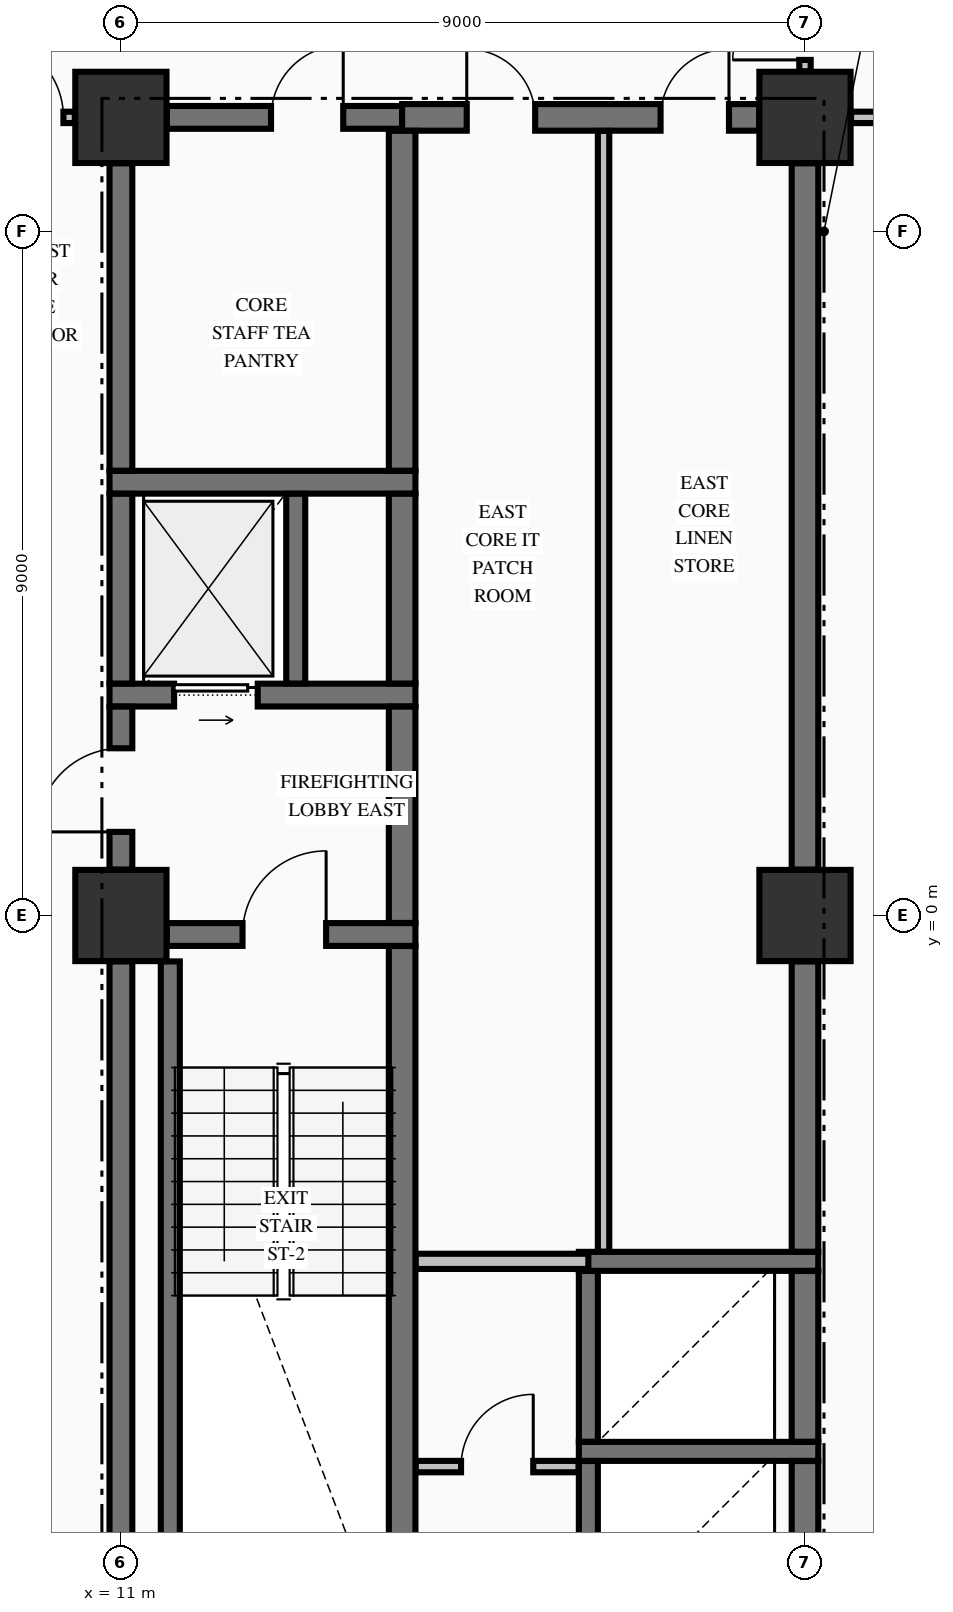
"""IFC4 building model, lengths in metres.
Left out: names, types, materials, properties, quantities, classifications, styles, units other than length and angle.
Written with IfcOpenShell. Run it as: python <this file> out.ifc"""

import sys

from ifc_helpers import new_model, si_unit, direction, frame, frame_2d, origin, origin_2d, place, context, subcontext, project, spatial, rectangle, extrude, element, fill, save


model = new_model("IFC4")
c1 = context("Model", 3, precision=1e-05, world=origin(), true_north=direction((0.0, 1.0)))
c2 = subcontext(c1, "Body", "Model", "MODEL_VIEW")
j1 = project(units=[si_unit("LENGTHUNIT", "METRE"), si_unit("PLANEANGLEUNIT", "RADIAN")], contexts=[c1])
p1 = place(None, origin())
s1 = spatial("IfcSite", under=j1, at=p1, CompositionType="ELEMENT")
p2 = place(p1, origin())
s2 = spatial("IfcBuilding", under=s1, at=p2, CompositionType="ELEMENT")
p3 = place(p2, frame((0.0, 0.0, 48.62)))
s3 = spatial("IfcBuildingStorey", under=s2, at=p3, CompositionType="ELEMENT", Elevation=48.62)
for number, where, z_axis, x_axis in (
    (1, (11.0, 0.0, -0.25), (0.0, 0.0, 1.0), (1.0, 0.0, 0.0)),
    (2, (11.0, 10.5, -0.25), (0.0, 0.0, 1.0), (1.0, 0.0, 0.0)),
    (3, (20.0, 10.5, -0.25), (0.0, 0.0, 1.0), (1.0, 0.0, 0.0)),
    (4, (20.0, 0.0, -0.25), (0.0, 0.0, 1.0), (1.0, 0.0, 0.0)),
):
    element("IfcColumn", number, at=place(p3, frame(where, z_axis=z_axis, x_axis=x_axis)), inside=s3, PredefinedType="COLUMN", context=c2, shape_type="SweptSolid", body=[
        extrude(rectangle(XDim=1.2, YDim=1.2, at=origin_2d()), origin(), (0.0, 0.0, 1.0), 3.395),
    ])
for number, where, z_axis, x_axis in (
    (5, (17.025, -7.05, 0.0), (0.0, 0.0, 1.0), (1.0, 0.0, 0.0)),
    (6, (17.025, -4.55, 0.0), (0.0, 0.0, 1.0), (1.0, 0.0, 0.0)),
):
    element("IfcWall", number, at=place(p3, frame(where, z_axis=z_axis, x_axis=x_axis)), inside=s3, PredefinedType="SOLIDWALL", context=c2, shape_type="SweptSolid", body=[
        extrude(rectangle(XDim=3.15, YDim=0.25, at=frame_2d((1.575, 0.0))), origin(), (0.0, 0.0, 1.0), 3.145),
    ])
p4 = place(p3, frame((11.604, -0.25, 0.0), z_axis=(0.0, 0.0, 1.0), x_axis=(1.0, 0.0, 0.0)))
e7 = element("IfcWall", 7, at=p4, inside=s3, PredefinedType="SHEAR", context=c2, shape_type="SweptSolid", body=[
    extrude(rectangle(XDim=3.271, YDim=0.3, at=frame_2d((1.635, 0.0))), origin(), (0.0, 0.0, 1.0), 3.145),
])
p5 = place(p4, frame((0.996, 0.0, 0.0)))
e8 = element("IfcOpeningElement", 8, at=p5, cuts=e7, PredefinedType="OPENING", context=c2, shape_type="SweptSolid", body=[
    extrude(rectangle(XDim=1.1, YDim=2.15, at=frame_2d((0.55, 1.075))), frame((0.0, 0.16, 0.0), z_axis=(0.0, -1.0, 0.0), x_axis=(1.0, 0.0, 0.0)), (0.0, 0.0, 1.0), 0.32),
])
p6 = place(p3, frame((10.85, 2.9, 0.0), z_axis=(0.0, 0.0, 1.0), x_axis=(1.0, 0.0, 0.0)))
e9 = element("IfcWall", 9, at=p6, inside=s3, PredefinedType="SHEAR", context=c2, shape_type="SweptSolid", body=[
    extrude(rectangle(XDim=4.025, YDim=0.3, at=frame_2d((2.012, 0.0))), origin(), (0.0, 0.0, 1.0), 3.145),
])
p7 = place(p6, frame((0.85, 0.0, 0.0)))
e10 = element("IfcOpeningElement", 10, at=p7, cuts=e9, PredefinedType="OPENING", context=c2, shape_type="SweptSolid", body=[
    extrude(rectangle(XDim=1.1, YDim=2.2, at=frame_2d((0.55, 1.1))), frame((0.0, 0.16, 0.0), z_axis=(0.0, -1.0, 0.0), x_axis=(1.0, 0.0, 0.0)), (0.0, 0.0, 1.0), 0.32),
])
p8 = place(p3, frame((10.85, 5.7, 0.0), z_axis=(0.0, 0.0, 1.0), x_axis=(1.0, 0.0, 0.0)))
e11 = element("IfcWall", 11, at=p8, inside=s3, PredefinedType="SHEAR", context=c2, shape_type="SweptSolid", body=[
    extrude(rectangle(XDim=4.025, YDim=0.3, at=frame_2d((2.012, 0.0))), origin(), (0.0, 0.0, 1.0), 3.145),
])
p9 = place(p3, frame((11.604, 10.5, 0.0), z_axis=(0.0, 0.0, 1.0), x_axis=(1.0, 0.0, 0.0)))
e12 = element("IfcWall", 12, at=p9, inside=s3, PredefinedType="SHEAR", context=c2, shape_type="SweptSolid", body=[
    extrude(rectangle(XDim=3.096, YDim=0.3, at=frame_2d((1.548, 0.0))), origin(), (0.0, 0.0, 1.0), 3.145),
])
p10 = place(p9, frame((1.371, 0.0, 0.0)))
e13 = element("IfcOpeningElement", 13, at=p10, cuts=e12, PredefinedType="OPENING", context=c2, shape_type="SweptSolid", body=[
    extrude(rectangle(XDim=0.95, YDim=2.15, at=frame_2d((0.475, 1.075))), frame((0.0, 0.16, 0.0), z_axis=(0.0, -1.0, 0.0), x_axis=(1.0, 0.0, 0.0)), (0.0, 0.0, 1.0), 0.32),
])
p11 = place(p3, frame((14.7, 10.5, 0.0), z_axis=(0.0, 0.0, 1.0), x_axis=(1.0, 0.0, 0.0)))
e14 = element("IfcWall", 14, at=p11, inside=s3, PredefinedType="SHEAR", context=c2, shape_type="SweptSolid", body=[
    extrude(rectangle(XDim=4.696, YDim=0.35, at=frame_2d((2.348, 0.0))), origin(), (0.0, 0.0, 1.0), 3.145),
])
p12 = place(p11, frame((0.85, 0.0, 0.0)))
e15 = element("IfcOpeningElement", 15, at=p12, cuts=e14, PredefinedType="OPENING", context=c2, shape_type="SweptSolid", body=[
    extrude(rectangle(XDim=0.9, YDim=2.15, at=frame_2d((0.45, 1.075))), frame((0.0, 0.185, 0.0), z_axis=(0.0, -1.0, 0.0), x_axis=(1.0, 0.0, 0.0)), (0.0, 0.0, 1.0), 0.37),
])
p13 = place(p11, frame((3.4, 0.0, 0.0)))
e16 = element("IfcOpeningElement", 16, at=p13, cuts=e14, PredefinedType="OPENING", context=c2, shape_type="SweptSolid", body=[
    extrude(rectangle(XDim=0.9, YDim=2.15, at=frame_2d((0.45, 1.075))), frame((0.0, 0.185, 0.0), z_axis=(0.0, -1.0, 0.0), x_axis=(1.0, 0.0, 0.0)), (0.0, 0.0, 1.0), 0.37),
])
p14 = place(p3, frame((14.878, -7.25, 0.0), z_axis=(0.0, 0.0, 1.0), x_axis=(1.0, 0.0, 0.0)))
e17 = element("IfcWall", 17, at=p14, inside=s3, PredefinedType="PARTITIONING", context=c2, shape_type="SweptSolid", body=[
    extrude(rectangle(XDim=2.144, YDim=0.15, at=frame_2d((1.072, 0.0))), origin(), (0.0, 0.0, 1.0), 3.145),
])
p15 = place(p14, frame((0.597, 0.0, 0.0)))
e18 = element("IfcOpeningElement", 18, at=p15, cuts=e17, PredefinedType="OPENING", context=c2, shape_type="SweptSolid", body=[
    extrude(rectangle(XDim=0.95, YDim=2.15, at=frame_2d((0.475, 1.075))), frame((0.0, 0.085, 0.0), z_axis=(0.0, -1.0, 0.0), x_axis=(1.0, 0.0, 0.0)), (0.0, 0.0, 1.0), 0.17),
])
p16 = place(p3, frame((14.878, -4.55, 0.0), z_axis=(0.0, 0.0, 1.0), x_axis=(1.0, 0.0, 0.0)))
e19 = element("IfcWall", 19, at=p16, inside=s3, PredefinedType="PARTITIONING", context=c2, shape_type="SweptSolid", body=[
    extrude(rectangle(XDim=2.272, YDim=0.2, at=frame_2d((1.136, 0.0))), origin(), (0.0, 0.0, 1.0), 3.145),
])
p17 = place(p3, frame((-10.394, 10.5, 0.0), z_axis=(0.0, 0.0, 1.0), x_axis=(1.0, 0.0, 0.0)))
e20 = element("IfcWall", 20, at=p17, inside=s3, PredefinedType="PARTITIONING", context=c2, shape_type="SweptSolid", body=[
    extrude(rectangle(XDim=20.788, YDim=0.15, at=frame_2d((10.394, 0.0))), origin(), (0.0, 0.0, 1.0), 3.145),
])
p18 = place(p17, frame((0.15, 0.0, 0.0)))
e21 = element("IfcOpeningElement", 21, at=p18, cuts=e20, PredefinedType="OPENING", context=c2, shape_type="SweptSolid", body=[
    extrude(rectangle(XDim=1.05, YDim=2.15, at=frame_2d((0.525, 1.075))), frame((0.0, 0.085, 0.0), z_axis=(0.0, -1.0, 0.0), x_axis=(1.0, 0.0, 0.0)), (0.0, 0.0, 1.0), 0.17),
])
p19 = place(p17, frame((19.588, 0.0, 0.0)))
e22 = element("IfcOpeningElement", 22, at=p19, cuts=e20, PredefinedType="OPENING", context=c2, shape_type="SweptSolid", body=[
    extrude(rectangle(XDim=1.05, YDim=2.15, at=frame_2d((0.525, 1.075))), frame((0.0, 0.085, 0.0), z_axis=(0.0, -1.0, 0.0), x_axis=(1.0, 0.0, 0.0)), (0.0, 0.0, 1.0), 0.17),
])
p20 = place(p3, frame((20.606, 10.5, 0.0), z_axis=(0.0, 0.0, 1.0), x_axis=(1.0, 0.0, 0.0)))
e23 = element("IfcWall", 23, at=p20, inside=s3, PredefinedType="PARTITIONING", context=c2, shape_type="SweptSolid", body=[
    extrude(rectangle(XDim=8.229, YDim=0.15, at=frame_2d((4.115, 0.0))), origin(), (0.0, 0.0, 1.0), 3.145),
])
p21 = place(p20, frame((3.394, 0.0, 0.0)))
e24 = element("IfcOpeningElement", 24, at=p21, cuts=e23, PredefinedType="OPENING", context=c2, shape_type="SweptSolid", body=[
    extrude(rectangle(XDim=1.0, YDim=2.15, at=frame_2d((0.5, 1.075))), frame((0.0, 0.085, 0.0), z_axis=(0.0, -1.0, 0.0), x_axis=(1.0, 0.0, 0.0)), (0.0, 0.0, 1.0), 0.17),
])
p22 = place(p3, frame((11.0, -9.346, 0.0), z_axis=(0.0, 0.0, 1.0), x_axis=(0.0, 1.0, 0.0)))
e25 = element("IfcWall", 25, at=p22, inside=s3, PredefinedType="SHEAR", context=c2, shape_type="SweptSolid", body=[
    extrude(rectangle(XDim=8.742, YDim=0.3, at=frame_2d((4.371, 0.0))), origin(), (0.0, 0.0, 1.0), 3.145),
])
p23 = place(p3, frame((11.0, 0.604, 0.0), z_axis=(0.0, 0.0, 1.0), x_axis=(0.0, 1.0, 0.0)))
e26 = element("IfcWall", 26, at=p23, inside=s3, PredefinedType="SHEAR", context=c2, shape_type="SweptSolid", body=[
    extrude(rectangle(XDim=2.144, YDim=0.3, at=frame_2d((1.072, 0.0))), origin(), (0.0, 0.0, 1.0), 3.145),
])
p24 = place(p23, frame((0.496, 0.0, 0.0)))
e27 = element("IfcOpeningElement", 27, at=p24, cuts=e26, PredefinedType="OPENING", context=c2, shape_type="SweptSolid", body=[
    extrude(rectangle(XDim=1.1, YDim=2.15, at=frame_2d((0.55, 1.075))), frame((0.0, 0.16, 0.0), z_axis=(0.0, -1.0, 0.0), x_axis=(1.0, 0.0, 0.0)), (0.0, 0.0, 1.0), 0.32),
])
p25 = place(p3, frame((11.0, 3.052, 0.0), z_axis=(0.0, 0.0, 1.0), x_axis=(0.0, 1.0, 0.0)))
e28 = element("IfcWall", 28, at=p25, inside=s3, PredefinedType="SHEAR", context=c2, shape_type="SweptSolid", body=[
    extrude(rectangle(XDim=2.496, YDim=0.3, at=frame_2d((1.248, 0.0))), origin(), (0.0, 0.0, 1.0), 3.145),
])
p26 = place(p3, frame((11.0, 5.852, 0.0), z_axis=(0.0, 0.0, 1.0), x_axis=(0.0, 1.0, 0.0)))
e29 = element("IfcWall", 29, at=p26, inside=s3, PredefinedType="SHEAR", context=c2, shape_type="SweptSolid", body=[
    extrude(rectangle(XDim=4.044, YDim=0.3, at=frame_2d((2.022, 0.0))), origin(), (0.0, 0.0, 1.0), 3.145),
])
p27 = place(p3, frame((11.65, -9.346, 0.0), z_axis=(0.0, 0.0, 1.0), x_axis=(0.0, 1.0, 0.0)))
e30 = element("IfcWall", 30, at=p27, inside=s3, PredefinedType="SOLIDWALL", context=c2, shape_type="SweptSolid", body=[
    extrude(rectangle(XDim=8.742, YDim=0.25, at=frame_2d((4.371, 0.0))), origin(), (0.0, 0.0, 1.0), 3.145),
])
p28 = place(p3, frame((13.3, 3.052, 0.0), z_axis=(0.0, 0.0, 1.0), x_axis=(0.0, 1.0, 0.0)))
e31 = element("IfcWall", 31, at=p28, inside=s3, PredefinedType="SOLIDWALL", context=c2, shape_type="SweptSolid", body=[
    extrude(rectangle(XDim=2.496, YDim=0.25, at=frame_2d((1.248, 0.0))), origin(), (0.0, 0.0, 1.0), 3.145),
])
p29 = place(p3, frame((14.7, -9.773, 0.0), z_axis=(0.0, 0.0, 1.0), x_axis=(0.0, 1.0, 0.0)))
e32 = element("IfcWall", 32, at=p29, inside=s3, PredefinedType="SHEAR", context=c2, shape_type="SweptSolid", body=[
    extrude(rectangle(XDim=9.371, YDim=0.35, at=frame_2d((4.686, 0.0))), origin(), (0.0, 0.0, 1.0), 3.145),
])
p30 = place(p3, frame((14.7, -0.098, 0.0), z_axis=(0.0, 0.0, 1.0), x_axis=(0.0, 1.0, 0.0)))
e33 = element("IfcWall", 33, at=p30, inside=s3, PredefinedType="SHEAR", context=c2, shape_type="SweptSolid", body=[
    extrude(rectangle(XDim=2.846, YDim=0.35, at=frame_2d((1.423, 0.0))), origin(), (0.0, 0.0, 1.0), 3.145),
])
p31 = place(p3, frame((14.7, 3.052, 0.0), z_axis=(0.0, 0.0, 1.0), x_axis=(0.0, 1.0, 0.0)))
e34 = element("IfcWall", 34, at=p31, inside=s3, PredefinedType="SHEAR", context=c2, shape_type="SweptSolid", body=[
    extrude(rectangle(XDim=2.496, YDim=0.35, at=frame_2d((1.248, 0.0))), origin(), (0.0, 0.0, 1.0), 3.145),
])
p32 = place(p3, frame((14.7, 5.852, 0.0), z_axis=(0.0, 0.0, 1.0), x_axis=(0.0, 1.0, 0.0)))
e35 = element("IfcWall", 35, at=p32, inside=s3, PredefinedType="SHEAR", context=c2, shape_type="SweptSolid", body=[
    extrude(rectangle(XDim=4.471, YDim=0.35, at=frame_2d((2.235, 0.0))), origin(), (0.0, 0.0, 1.0), 3.145),
])
p33 = place(p3, frame((17.15, -9.773, 0.0), z_axis=(0.0, 0.0, 1.0), x_axis=(0.0, 1.0, 0.0)))
e36 = element("IfcWall", 36, at=p33, inside=s3, PredefinedType="SOLIDWALL", context=c2, shape_type="SweptSolid", body=[
    extrude(rectangle(XDim=2.596, YDim=0.25, at=frame_2d((1.298, 0.0))), origin(), (0.0, 0.0, 1.0), 3.145),
])
p34 = place(p3, frame((17.15, -6.923, 0.0), z_axis=(0.0, 0.0, 1.0), x_axis=(0.0, 1.0, 0.0)))
e37 = element("IfcWall", 37, at=p34, inside=s3, PredefinedType="SOLIDWALL", context=c2, shape_type="SweptSolid", body=[
    extrude(rectangle(XDim=2.246, YDim=0.25, at=frame_2d((1.123, 0.0))), origin(), (0.0, 0.0, 1.0), 3.145),
])
p35 = place(p3, frame((20.0, -9.346, 0.0), z_axis=(0.0, 0.0, 1.0), x_axis=(0.0, 1.0, 0.0)))
e38 = element("IfcWall", 38, at=p35, inside=s3, PredefinedType="SHEAR", context=c2, shape_type="SweptSolid", body=[
    extrude(rectangle(XDim=2.169, YDim=0.35, at=frame_2d((1.084, 0.0))), origin(), (0.0, 0.0, 1.0), 3.145),
])
p36 = place(p3, frame((20.0, -6.923, 0.0), z_axis=(0.0, 0.0, 1.0), x_axis=(0.0, 1.0, 0.0)))
e39 = element("IfcWall", 39, at=p36, inside=s3, PredefinedType="SHEAR", context=c2, shape_type="SweptSolid", body=[
    extrude(rectangle(XDim=2.246, YDim=0.35, at=frame_2d((1.123, 0.0))), origin(), (0.0, 0.0, 1.0), 3.145),
])
p37 = place(p3, frame((20.0, -4.423, 0.0), z_axis=(0.0, 0.0, 1.0), x_axis=(0.0, 1.0, 0.0)))
e40 = element("IfcWall", 40, at=p37, inside=s3, PredefinedType="SHEAR", context=c2, shape_type="SweptSolid", body=[
    extrude(rectangle(XDim=3.819, YDim=0.35, at=frame_2d((1.91, 0.0))), origin(), (0.0, 0.0, 1.0), 3.145),
])
p38 = place(p3, frame((20.0, 0.604, 0.0), z_axis=(0.0, 0.0, 1.0), x_axis=(0.0, 1.0, 0.0)))
e41 = element("IfcWall", 41, at=p38, inside=s3, PredefinedType="SHEAR", context=c2, shape_type="SweptSolid", body=[
    extrude(rectangle(XDim=9.292, YDim=0.35, at=frame_2d((4.646, 0.0))), origin(), (0.0, 0.0, 1.0), 3.145),
])
p39 = place(p3, frame((17.35, -4.422, 0.0), z_axis=(0.0, 0.0, 1.0), x_axis=(0.0, 1.0, 0.0)))
e42 = element("IfcWall", 42, at=p39, inside=s3, PredefinedType="PARTITIONING", context=c2, shape_type="SweptSolid", body=[
    extrude(rectangle(XDim=14.744, YDim=0.15, at=frame_2d((7.372, 0.0))), origin(), (0.0, 0.0, 1.0), 3.145),
])
p40 = place(p3, frame((20.0, 11.106, 0.0), z_axis=(0.0, 0.0, 1.0), x_axis=(0.0, 1.0, 0.0)))
e43 = element("IfcWall", 43, at=p40, inside=s3, PredefinedType="PARTITIONING", context=c2, shape_type="SweptSolid", body=[
    extrude(rectangle(XDim=1.766, YDim=0.15, at=frame_2d((0.883, 0.0))), origin(), (0.0, 0.0, 1.0), 2.485),
])
p41 = place(p40, frame((0.15, 0.0, 0.0)))
e44 = element("IfcOpeningElement", 44, at=p41, cuts=e43, PredefinedType="OPENING", context=c2, shape_type="SweptSolid", body=[
    extrude(rectangle(XDim=0.95, YDim=2.15, at=frame_2d((0.475, 1.075))), frame((0.0, 0.085, 0.0), z_axis=(0.0, -1.0, 0.0), x_axis=(1.0, 0.0, 0.0)), (0.0, 0.0, 1.0), 0.17),
])
p42 = place(p5, origin())
e45 = element("IfcDoor", 45, at=p42, inside=s3, OperationType="SINGLE_SWING_RIGHT", PredefinedType="DOOR", context=c2, shape_type="SweptSolid", body=[
    extrude(rectangle(XDim=1.1, YDim=2.15, at=frame_2d((0.55, 1.075))), frame((0.0, 0.025, 0.0), z_axis=(0.0, -1.0, 0.0), x_axis=(1.0, 0.0, 0.0)), (0.0, 0.0, 1.0), 0.05),
])
fill(e8, e45)
p43 = place(p24, origin())
e46 = element("IfcDoor", 46, at=p43, inside=s3, OperationType="SINGLE_SWING_LEFT", PredefinedType="DOOR", context=c2, shape_type="SweptSolid", body=[
    extrude(rectangle(XDim=1.1, YDim=2.15, at=frame_2d((0.55, 1.075))), frame((0.0, 0.025, 0.0), z_axis=(0.0, -1.0, 0.0), x_axis=(1.0, 0.0, 0.0)), (0.0, 0.0, 1.0), 0.05),
])
fill(e27, e46)
p44 = place(p7, origin())
e47 = element("IfcDoor", 47, at=p44, inside=s3, OperationType="SLIDING_TO_RIGHT", PredefinedType="DOOR", context=c2, shape_type="SweptSolid", body=[
    extrude(rectangle(XDim=1.1, YDim=2.2, at=frame_2d((0.55, 1.1))), frame((0.0, 0.025, 0.0), z_axis=(0.0, -1.0, 0.0), x_axis=(1.0, 0.0, 0.0)), (0.0, 0.0, 1.0), 0.05),
])
fill(e10, e47)
p45 = place(p10, origin())
e48 = element("IfcDoor", 48, at=p45, inside=s3, OperationType="SINGLE_SWING_RIGHT", PredefinedType="DOOR", context=c2, shape_type="SweptSolid", body=[
    extrude(rectangle(XDim=0.95, YDim=2.15, at=frame_2d((0.475, 1.075))), frame((0.0, 0.025, 0.0), z_axis=(0.0, -1.0, 0.0), x_axis=(1.0, 0.0, 0.0)), (0.0, 0.0, 1.0), 0.05),
])
fill(e13, e48)
p46 = place(p15, origin())
e49 = element("IfcDoor", 49, at=p46, inside=s3, OperationType="SINGLE_SWING_RIGHT", PredefinedType="DOOR", context=c2, shape_type="SweptSolid", body=[
    extrude(rectangle(XDim=0.95, YDim=2.15, at=frame_2d((0.475, 1.075))), frame((0.0, 0.025, 0.0), z_axis=(0.0, -1.0, 0.0), x_axis=(1.0, 0.0, 0.0)), (0.0, 0.0, 1.0), 0.05),
])
fill(e18, e49)
p47 = place(p12, origin())
e50 = element("IfcDoor", 50, at=p47, inside=s3, OperationType="SINGLE_SWING_LEFT", PredefinedType="DOOR", context=c2, shape_type="SweptSolid", body=[
    extrude(rectangle(XDim=0.9, YDim=2.15, at=frame_2d((0.45, 1.075))), frame((0.0, 0.025, 0.0), z_axis=(0.0, -1.0, 0.0), x_axis=(1.0, 0.0, 0.0)), (0.0, 0.0, 1.0), 0.05),
])
fill(e15, e50)
p48 = place(p13, origin())
e51 = element("IfcDoor", 51, at=p48, inside=s3, OperationType="SINGLE_SWING_RIGHT", PredefinedType="DOOR", context=c2, shape_type="SweptSolid", body=[
    extrude(rectangle(XDim=0.9, YDim=2.15, at=frame_2d((0.45, 1.075))), frame((0.0, 0.025, 0.0), z_axis=(0.0, -1.0, 0.0), x_axis=(1.0, 0.0, 0.0)), (0.0, 0.0, 1.0), 0.05),
])
fill(e16, e51)
p49 = place(p19, origin())
e52 = element("IfcDoor", 52, at=p49, inside=s3, OperationType="SINGLE_SWING_LEFT", PredefinedType="DOOR", context=c2, shape_type="SweptSolid", body=[
    extrude(rectangle(XDim=1.05, YDim=2.15, at=frame_2d((0.525, 1.075))), frame((0.0, 0.025, 0.0), z_axis=(0.0, -1.0, 0.0), x_axis=(1.0, 0.0, 0.0)), (0.0, 0.0, 1.0), 0.05),
])
fill(e22, e52)
p50 = place(p41, origin())
e53 = element("IfcDoor", 53, at=p50, inside=s3, OperationType="SINGLE_SWING_LEFT", PredefinedType="DOOR", context=c2, shape_type="SweptSolid", body=[
    extrude(rectangle(XDim=0.95, YDim=2.15, at=frame_2d((0.475, 1.075))), frame((0.0, 0.025, 0.0), z_axis=(0.0, -1.0, 0.0), x_axis=(1.0, 0.0, 0.0)), (0.0, 0.0, 1.0), 0.05),
])
fill(e44, e53)
save(model, sys.argv[1])
